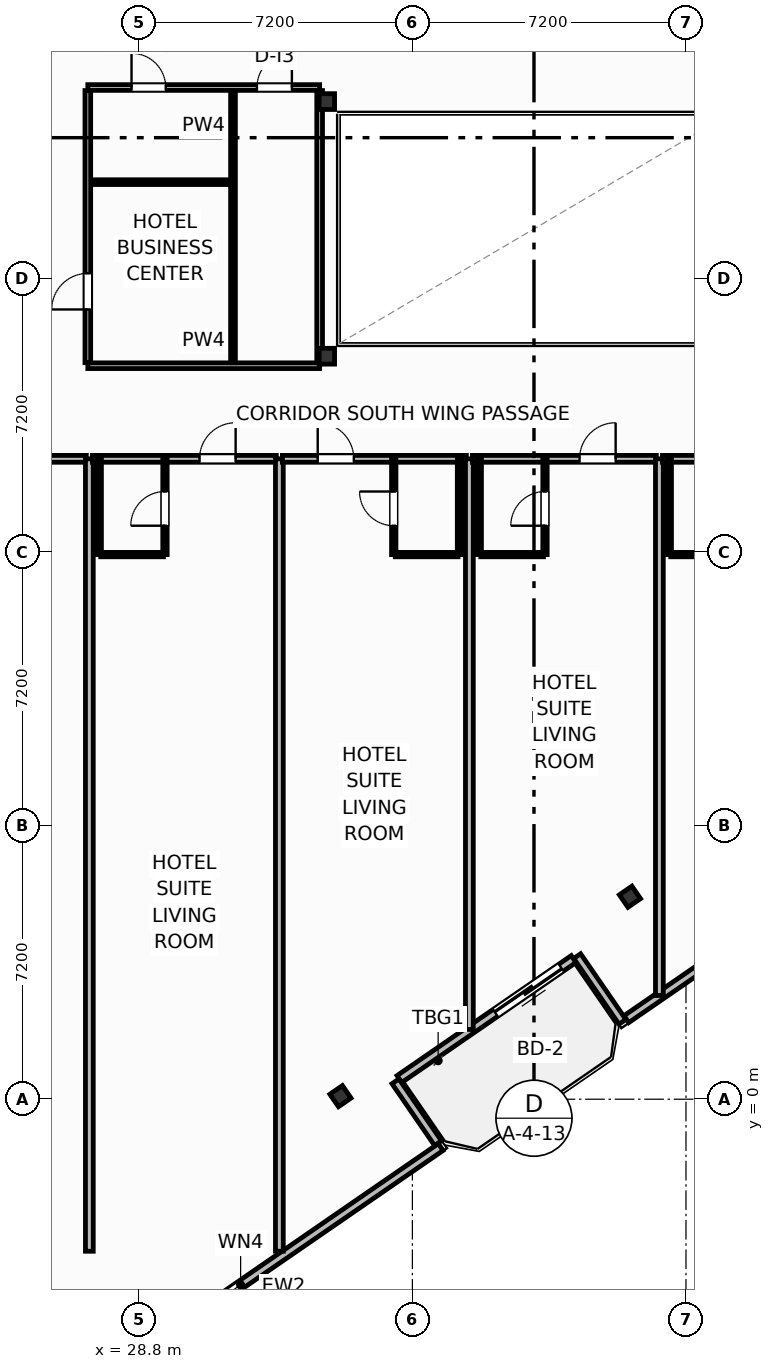
"""IFC4 building model, lengths in metres.
Left out: names, types, materials, properties, quantities, classifications, styles, units other than length and angle.
Written with IfcOpenShell. Run it as: python <this file> out.ifc"""

import sys

from ifc_helpers import new_model, si_unit, direction, frame, frame_2d, origin, origin_2d, place, context, subcontext, project, spatial, rectangle, i_section, extrude, element, fill, save


model = new_model("IFC4")
c1 = context("Model", 3, precision=1e-05, world=origin(), true_north=direction((0.0, 1.0)))
c2 = subcontext(c1, "Body", "Model", "MODEL_VIEW")
j1 = project(units=[si_unit("LENGTHUNIT", "METRE"), si_unit("PLANEANGLEUNIT", "RADIAN")], contexts=[c1])
p1 = place(None, origin())
s1 = spatial("IfcSite", under=j1, at=p1, CompositionType="ELEMENT")
p2 = place(p1, origin())
s2 = spatial("IfcBuilding", under=s1, at=p2, CompositionType="ELEMENT")
p3 = place(p2, frame((0.0, 0.0, 280.4)))
s3 = spatial("IfcBuildingStorey", under=s2, at=p3, CompositionType="ELEMENT", Elevation=280.4)
for number, where, z_axis, x_axis in (
    (1, (33.75, 19.55, 0.0), (0.0, 0.0, 1.0), (1.0, 0.0, 0.0)),
    (2, (33.75, 26.25, 0.0), (0.0, 0.0, 1.0), (1.0, 0.0, 0.0)),
):
    element("IfcColumn", number, at=place(p3, frame(where, z_axis=z_axis, x_axis=x_axis)), inside=s3, PredefinedType="COLUMN", context=c2, shape_type="SweptSolid", body=[
        extrude(i_section(OverallWidth=0.406, OverallDepth=0.416, WebThickness=0.03, FlangeThickness=0.048, FilletRadius=0.025, at=origin_2d()), origin(), (0.0, 0.0, 1.0), 3.7),
    ])
for number, where, z_axis, x_axis in (
    (3, (34.107, 0.081, 0.0), (0.0, 0.0, 1.0), (0.824, 0.567, 0.0)),
    (4, (41.725, 5.328, 0.0), (0.0, 0.0, 1.0), (0.824, 0.567, 0.0)),
):
    element("IfcColumn", number, at=place(p3, frame(where, z_axis=z_axis, x_axis=x_axis)), inside=s3, PredefinedType="COLUMN", context=c2, shape_type="SweptSolid", body=[
        extrude(i_section(OverallWidth=0.401, OverallDepth=0.399, WebThickness=0.025, FlangeThickness=0.04, FilletRadius=0.022, at=origin_2d()), origin(), (0.0, 0.0, 1.0), 3.7),
    ])
p4 = place(p3, frame((40.244, 3.688, 0.0), z_axis=(0.0, 0.0, 1.0), x_axis=(-0.823541290762, -0.567256328665, 0.0)))
e5 = element("IfcWall", 5, at=p4, inside=s3, PredefinedType="SOLIDWALL", context=c2, shape_type="SweptSolid", body=[
    extrude(rectangle(XDim=5.567, YDim=0.22, at=frame_2d((2.784, 0.0))), origin(), (0.0, 0.0, 1.0), 2.73),
])
p5 = place(p4, frame((0.4, 0.0, 0.0)))
e6 = element("IfcOpeningElement", 6, at=p5, cuts=e5, PredefinedType="OPENING", context=c2, shape_type="SweptSolid", body=[
    extrude(rectangle(XDim=2.1, YDim=2.3, at=frame_2d((1.05, 1.15))), frame((0.0, 0.12, 0.0), z_axis=(0.0, -1.0, 0.0), x_axis=(1.0, 0.0, 0.0)), (0.0, 0.0, 1.0), 0.24),
])
p6 = place(p3, frame((27.704, -7.488, 0.0), z_axis=(0.0, 0.0, 1.0), x_axis=(0.823529068157, 0.567274073003, 0.0)))
e7 = element("IfcWall", 7, at=p6, inside=s3, PredefinedType="SOLIDWALL", context=c2, shape_type="SweptSolid", body=[
    extrude(rectangle(XDim=10.98, YDim=0.22, at=frame_2d((5.49, 0.0))), origin(), (0.0, 0.0, 1.0), 2.73),
])
p7 = place(p6, frame((2.486, 0.0, 0.8)))
e8 = element("IfcOpeningElement", 8, at=p7, cuts=e7, PredefinedType="OPENING", context=c2, shape_type="SweptSolid", body=[
    extrude(rectangle(XDim=2.1, YDim=1.75, at=frame_2d((1.05, 0.875))), frame((0.0, 0.12, 0.0), z_axis=(0.0, -1.0, 0.0), x_axis=(1.0, 0.0, 0.0)), (0.0, 0.0, 1.0), 0.24),
])
p8 = place(p3, frame((36.675, -1.156, 0.0), z_axis=(0.0, 0.0, 1.0), x_axis=(-0.567215821234, 0.823569190865, 0.0)))
e9 = element("IfcWall", 9, at=p8, inside=s3, PredefinedType="SOLIDWALL", context=c2, shape_type="SweptSolid", body=[
    extrude(rectangle(XDim=1.975, YDim=0.22, at=frame_2d((0.988, 0.0))), origin(), (0.0, 0.0, 1.0), 2.73),
])
p9 = place(p3, frame((40.337, 3.765, 0.0), z_axis=(0.0, 0.0, 1.0), x_axis=(0.567352541689, -0.823475010816, 0.0)))
e10 = element("IfcWall", 10, at=p9, inside=s3, PredefinedType="SOLIDWALL", context=c2, shape_type="SweptSolid", body=[
    extrude(rectangle(XDim=2.1, YDim=0.22, at=frame_2d((1.05, 0.0))), origin(), (0.0, 0.0, 1.0), 2.73),
])
p10 = place(p3, frame((41.631, 2.106, 0.0), z_axis=(0.0, 0.0, 1.0), x_axis=(0.823530942962, 0.56727135128, 0.0)))
e11 = element("IfcWall", 11, at=p10, inside=s3, PredefinedType="SOLIDWALL", context=c2, shape_type="SweptSolid", body=[
    extrude(rectangle(XDim=8.035, YDim=0.22, at=frame_2d((4.018, 0.0))), origin(), (0.0, 0.0, 1.0), 2.73),
])
p11 = place(p10, frame((2.968, 0.0, 0.8)))
e12 = element("IfcOpeningElement", 12, at=p11, cuts=e11, PredefinedType="OPENING", context=c2, shape_type="SweptSolid", body=[
    extrude(rectangle(XDim=2.1, YDim=1.75, at=frame_2d((1.05, 0.875))), frame((0.0, 0.12, 0.0), z_axis=(0.0, -1.0, 0.0), x_axis=(1.0, 0.0, 0.0)), (0.0, 0.0, 1.0), 0.24),
])
p12 = place(p3, frame((22.58, 16.85, 0.0), z_axis=(0.0, 0.0, 1.0), x_axis=(1.0, 0.0, 0.0)))
e13 = element("IfcWall", 13, at=p12, inside=s3, PredefinedType="PARTITIONING", context=c2, shape_type="SweptSolid", body=[
    extrude(rectangle(XDim=4.84, YDim=0.18, at=frame_2d((2.42, 0.0))), origin(), (0.0, 0.0, 1.0), 3.45),
])
p13 = place(p12, frame((2.819, 0.0, 0.0)))
e14 = element("IfcOpeningElement", 14, at=p13, cuts=e13, PredefinedType="OPENING", context=c2, shape_type="SweptSolid", body=[
    extrude(rectangle(XDim=0.95, YDim=2.15, at=frame_2d((0.475, 1.075))), frame((0.0, 0.1, 0.0), z_axis=(0.0, -1.0, 0.0), x_axis=(1.0, 0.0, 0.0)), (0.0, 0.0, 1.0), 0.2),
])
p14 = place(p3, frame((27.5, -4.0, 0.0), z_axis=(0.0, 0.0, 1.0), x_axis=(0.0, 1.0, 0.0)))
e15 = element("IfcWall", 15, at=p14, inside=s3, PredefinedType="PARTITIONING", context=c2, shape_type="SweptSolid", body=[
    extrude(rectangle(XDim=20.85, YDim=0.205, at=frame_2d((10.425, 0.0))), origin(), (0.0, 0.0, 1.0), 3.45),
])
p15 = place(p3, frame((27.58, 16.85, 0.0), z_axis=(0.0, 0.0, 1.0), x_axis=(1.0, 0.0, 0.0)))
e16 = element("IfcWall", 16, at=p15, inside=s3, PredefinedType="PARTITIONING", context=c2, shape_type="SweptSolid", body=[
    extrude(rectangle(XDim=4.84, YDim=0.18, at=frame_2d((2.42, 0.0))), origin(), (0.0, 0.0, 1.0), 3.45),
])
p16 = place(p15, frame((2.819, 0.0, 0.0)))
e17 = element("IfcOpeningElement", 17, at=p16, cuts=e16, PredefinedType="OPENING", context=c2, shape_type="SweptSolid", body=[
    extrude(rectangle(XDim=0.95, YDim=2.15, at=frame_2d((0.475, 1.075))), frame((0.0, 0.1, 0.0), z_axis=(0.0, -1.0, 0.0), x_axis=(1.0, 0.0, 0.0)), (0.0, 0.0, 1.0), 0.2),
])
p17 = place(p3, frame((27.8, 14.33, 0.0), z_axis=(0.0, 0.0, 1.0), x_axis=(1.0, 0.0, 0.0)))
e18 = element("IfcWall", 18, at=p17, inside=s3, PredefinedType="PARTITIONING", context=c2, shape_type="SweptSolid", body=[
    extrude(rectangle(XDim=1.65, YDim=0.115, at=frame_2d((0.825, 0.0))), origin(), (0.0, 0.0, 1.0), 3.45),
])
p18 = place(p3, frame((29.49, 14.33, 0.0), z_axis=(0.0, 0.0, 1.0), x_axis=(0.0, 1.0, 0.0)))
e19 = element("IfcWall", 19, at=p18, inside=s3, PredefinedType="PARTITIONING", context=c2, shape_type="SweptSolid", body=[
    extrude(rectangle(XDim=2.52, YDim=0.115, at=frame_2d((1.26, 0.0))), origin(), (0.0, 0.0, 1.0), 3.45),
])
p19 = place(p18, frame((0.76, 0.0, 0.0)))
e20 = element("IfcOpeningElement", 20, at=p19, cuts=e19, PredefinedType="OPENING", context=c2, shape_type="SweptSolid", body=[
    extrude(rectangle(XDim=0.9, YDim=2.05, at=frame_2d((0.45, 1.025))), frame((0.0, 0.067, 0.0), z_axis=(0.0, -1.0, 0.0), x_axis=(1.0, 0.0, 0.0)), (0.0, 0.0, 1.0), 0.135),
])
p20 = place(p3, frame((27.76, 14.33, 0.0), z_axis=(0.0, 0.0, 1.0), x_axis=(0.0, 1.0, 0.0)))
e21 = element("IfcWall", 21, at=p20, inside=s3, PredefinedType="PARTITIONING", context=c2, shape_type="SweptSolid", body=[
    extrude(rectangle(XDim=2.52, YDim=0.115, at=frame_2d((1.26, 0.0))), origin(), (0.0, 0.0, 1.0), 3.45),
])
p21 = place(p3, frame((32.5, -4.0, 0.0), z_axis=(0.0, 0.0, 1.0), x_axis=(0.0, 1.0, 0.0)))
e22 = element("IfcWall", 22, at=p21, inside=s3, PredefinedType="PARTITIONING", context=c2, shape_type="SweptSolid", body=[
    extrude(rectangle(XDim=20.85, YDim=0.205, at=frame_2d((10.425, 0.0))), origin(), (0.0, 0.0, 1.0), 3.45),
])
p22 = place(p3, frame((32.58, 16.85, 0.0), z_axis=(0.0, 0.0, 1.0), x_axis=(1.0, 0.0, 0.0)))
e23 = element("IfcWall", 23, at=p22, inside=s3, PredefinedType="PARTITIONING", context=c2, shape_type="SweptSolid", body=[
    extrude(rectangle(XDim=4.84, YDim=0.18, at=frame_2d((2.42, 0.0))), origin(), (0.0, 0.0, 1.0), 3.45),
])
p23 = place(p22, frame((0.929, 0.0, 0.0)))
e24 = element("IfcOpeningElement", 24, at=p23, cuts=e23, PredefinedType="OPENING", context=c2, shape_type="SweptSolid", body=[
    extrude(rectangle(XDim=0.95, YDim=2.15, at=frame_2d((0.475, 1.075))), frame((0.0, 0.1, 0.0), z_axis=(0.0, -1.0, 0.0), x_axis=(1.0, 0.0, 0.0)), (0.0, 0.0, 1.0), 0.2),
])
p24 = place(p3, frame((35.55, 14.33, 0.0), z_axis=(0.0, 0.0, 1.0), x_axis=(1.0, 0.0, 0.0)))
e25 = element("IfcWall", 25, at=p24, inside=s3, PredefinedType="PARTITIONING", context=c2, shape_type="SweptSolid", body=[
    extrude(rectangle(XDim=1.65, YDim=0.115, at=frame_2d((0.825, 0.0))), origin(), (0.0, 0.0, 1.0), 3.45),
])
p25 = place(p3, frame((35.51, 14.33, 0.0), z_axis=(0.0, 0.0, 1.0), x_axis=(0.0, 1.0, 0.0)))
e26 = element("IfcWall", 26, at=p25, inside=s3, PredefinedType="PARTITIONING", context=c2, shape_type="SweptSolid", body=[
    extrude(rectangle(XDim=2.52, YDim=0.115, at=frame_2d((1.26, 0.0))), origin(), (0.0, 0.0, 1.0), 3.45),
])
p26 = place(p25, frame((0.76, 0.0, 0.0)))
e27 = element("IfcOpeningElement", 27, at=p26, cuts=e26, PredefinedType="OPENING", context=c2, shape_type="SweptSolid", body=[
    extrude(rectangle(XDim=0.9, YDim=2.05, at=frame_2d((0.45, 1.025))), frame((0.0, 0.067, 0.0), z_axis=(0.0, -1.0, 0.0), x_axis=(1.0, 0.0, 0.0)), (0.0, 0.0, 1.0), 0.135),
])
p27 = place(p3, frame((37.24, 14.33, 0.0), z_axis=(0.0, 0.0, 1.0), x_axis=(0.0, 1.0, 0.0)))
e28 = element("IfcWall", 28, at=p27, inside=s3, PredefinedType="PARTITIONING", context=c2, shape_type="SweptSolid", body=[
    extrude(rectangle(XDim=2.52, YDim=0.115, at=frame_2d((1.26, 0.0))), origin(), (0.0, 0.0, 1.0), 3.45),
])
p28 = place(p3, frame((37.5, 1.835, 0.0), z_axis=(0.0, 0.0, 1.0), x_axis=(0.0, 1.0, 0.0)))
e29 = element("IfcWall", 29, at=p28, inside=s3, PredefinedType="PARTITIONING", context=c2, shape_type="SweptSolid", body=[
    extrude(rectangle(XDim=15.015, YDim=0.205, at=frame_2d((7.508, 0.0))), origin(), (0.0, 0.0, 1.0), 3.45),
])
p29 = place(p3, frame((37.58, 16.85, 0.0), z_axis=(0.0, 0.0, 1.0), x_axis=(1.0, 0.0, 0.0)))
e30 = element("IfcWall", 30, at=p29, inside=s3, PredefinedType="PARTITIONING", context=c2, shape_type="SweptSolid", body=[
    extrude(rectangle(XDim=4.84, YDim=0.18, at=frame_2d((2.42, 0.0))), origin(), (0.0, 0.0, 1.0), 3.45),
])
p30 = place(p29, frame((2.819, 0.0, 0.0)))
e31 = element("IfcOpeningElement", 31, at=p30, cuts=e30, PredefinedType="OPENING", context=c2, shape_type="SweptSolid", body=[
    extrude(rectangle(XDim=0.95, YDim=2.15, at=frame_2d((0.475, 1.075))), frame((0.0, 0.1, 0.0), z_axis=(0.0, -1.0, 0.0), x_axis=(1.0, 0.0, 0.0)), (0.0, 0.0, 1.0), 0.2),
])
p31 = place(p3, frame((37.8, 14.33, 0.0), z_axis=(0.0, 0.0, 1.0), x_axis=(1.0, 0.0, 0.0)))
e32 = element("IfcWall", 32, at=p31, inside=s3, PredefinedType="PARTITIONING", context=c2, shape_type="SweptSolid", body=[
    extrude(rectangle(XDim=1.65, YDim=0.115, at=frame_2d((0.825, 0.0))), origin(), (0.0, 0.0, 1.0), 3.45),
])
p32 = place(p3, frame((39.49, 14.33, 0.0), z_axis=(0.0, 0.0, 1.0), x_axis=(0.0, 1.0, 0.0)))
e33 = element("IfcWall", 33, at=p32, inside=s3, PredefinedType="PARTITIONING", context=c2, shape_type="SweptSolid", body=[
    extrude(rectangle(XDim=2.52, YDim=0.115, at=frame_2d((1.26, 0.0))), origin(), (0.0, 0.0, 1.0), 3.45),
])
p33 = place(p32, frame((0.76, 0.0, 0.0)))
e34 = element("IfcOpeningElement", 34, at=p33, cuts=e33, PredefinedType="OPENING", context=c2, shape_type="SweptSolid", body=[
    extrude(rectangle(XDim=0.9, YDim=2.05, at=frame_2d((0.45, 1.025))), frame((0.0, 0.067, 0.0), z_axis=(0.0, -1.0, 0.0), x_axis=(1.0, 0.0, 0.0)), (0.0, 0.0, 1.0), 0.135),
])
p34 = place(p3, frame((37.76, 14.33, 0.0), z_axis=(0.0, 0.0, 1.0), x_axis=(0.0, 1.0, 0.0)))
e35 = element("IfcWall", 35, at=p34, inside=s3, PredefinedType="PARTITIONING", context=c2, shape_type="SweptSolid", body=[
    extrude(rectangle(XDim=2.52, YDim=0.115, at=frame_2d((1.26, 0.0))), origin(), (0.0, 0.0, 1.0), 3.45),
])
p35 = place(p3, frame((42.5, 2.729, 0.0), z_axis=(0.0, 0.0, 1.0), x_axis=(0.0, 1.0, 0.0)))
e36 = element("IfcWall", 36, at=p35, inside=s3, PredefinedType="PARTITIONING", context=c2, shape_type="SweptSolid", body=[
    extrude(rectangle(XDim=14.121, YDim=0.205, at=frame_2d((7.061, 0.0))), origin(), (0.0, 0.0, 1.0), 2.739),
])
p36 = place(p3, frame((42.58, 16.85, 0.0), z_axis=(0.0, 0.0, 1.0), x_axis=(1.0, 0.0, 0.0)))
e37 = element("IfcWall", 37, at=p36, inside=s3, PredefinedType="PARTITIONING", context=c2, shape_type="SweptSolid", body=[
    extrude(rectangle(XDim=4.84, YDim=0.18, at=frame_2d((2.42, 0.0))), origin(), (0.0, 0.0, 1.0), 3.45),
])
p37 = place(p36, frame((2.819, 0.0, 0.0)))
e38 = element("IfcOpeningElement", 38, at=p37, cuts=e37, PredefinedType="OPENING", context=c2, shape_type="SweptSolid", body=[
    extrude(rectangle(XDim=0.95, YDim=2.15, at=frame_2d((0.475, 1.075))), frame((0.0, 0.1, 0.0), z_axis=(0.0, -1.0, 0.0), x_axis=(1.0, 0.0, 0.0)), (0.0, 0.0, 1.0), 0.2),
])
p38 = place(p3, frame((42.8, 14.33, 0.0), z_axis=(0.0, 0.0, 1.0), x_axis=(1.0, 0.0, 0.0)))
e39 = element("IfcWall", 39, at=p38, inside=s3, PredefinedType="PARTITIONING", context=c2, shape_type="SweptSolid", body=[
    extrude(rectangle(XDim=1.65, YDim=0.115, at=frame_2d((0.825, 0.0))), origin(), (0.0, 0.0, 1.0), 3.45),
])
p39 = place(p3, frame((42.76, 14.33, 0.0), z_axis=(0.0, 0.0, 1.0), x_axis=(0.0, 1.0, 0.0)))
e40 = element("IfcWall", 40, at=p39, inside=s3, PredefinedType="PARTITIONING", context=c2, shape_type="SweptSolid", body=[
    extrude(rectangle(XDim=2.52, YDim=0.115, at=frame_2d((1.26, 0.0))), origin(), (0.0, 0.0, 1.0), 3.45),
])
p40 = place(p3, frame((27.46, 19.3, 0.0), z_axis=(0.0, 0.0, 1.0), x_axis=(1.0, 0.0, 0.0)))
e41 = element("IfcWall", 41, at=p40, inside=s3, PredefinedType="PARTITIONING", context=c2, shape_type="SweptSolid", body=[
    extrude(rectangle(XDim=6.1, YDim=0.15, at=frame_2d((3.05, 0.0))), origin(), (0.0, 0.0, 1.0), 2.662),
])
p41 = place(p3, frame((27.46, 26.62, 0.0), z_axis=(0.0, 0.0, 1.0), x_axis=(1.0, 0.0, 0.0)))
e42 = element("IfcWall", 42, at=p41, inside=s3, PredefinedType="PARTITIONING", context=c2, shape_type="SweptSolid", body=[
    extrude(rectangle(XDim=6.1, YDim=0.15, at=frame_2d((3.05, 0.0))), origin(), (0.0, 0.0, 1.0), 2.662),
])
p42 = place(p41, frame((1.15, 0.0, 0.0)))
e43 = element("IfcOpeningElement", 43, at=p42, cuts=e42, PredefinedType="OPENING", context=c2, shape_type="SweptSolid", body=[
    extrude(rectangle(XDim=0.9, YDim=2.05, at=frame_2d((0.45, 1.025))), frame((0.0, 0.085, 0.0), z_axis=(0.0, -1.0, 0.0), x_axis=(1.0, 0.0, 0.0)), (0.0, 0.0, 1.0), 0.17),
])
p43 = place(p41, frame((4.45, 0.0, 0.0)))
e44 = element("IfcOpeningElement", 44, at=p43, cuts=e42, PredefinedType="OPENING", context=c2, shape_type="SweptSolid", body=[
    extrude(rectangle(XDim=0.92, YDim=2.05, at=frame_2d((0.46, 1.025))), frame((0.0, 0.085, 0.0), z_axis=(0.0, -1.0, 0.0), x_axis=(1.0, 0.0, 0.0)), (0.0, 0.0, 1.0), 0.17),
])
p44 = place(p3, frame((31.28, 19.38, 0.0), z_axis=(0.0, 0.0, 1.0), x_axis=(0.0, 1.0, 0.0)))
e45 = element("IfcWall", 45, at=p44, inside=s3, PredefinedType="PARTITIONING", context=c2, shape_type="SweptSolid", body=[
    extrude(rectangle(XDim=7.16, YDim=0.125, at=frame_2d((3.58, 0.0))), origin(), (0.0, 0.0, 1.0), 3.45),
])
p45 = place(p3, frame((27.52, 24.13, 0.0), z_axis=(0.0, 0.0, 1.0), x_axis=(1.0, 0.0, 0.0)))
e46 = element("IfcWall", 46, at=p45, inside=s3, PredefinedType="PARTITIONING", context=c2, shape_type="SweptSolid", body=[
    extrude(rectangle(XDim=3.7, YDim=0.125, at=frame_2d((1.85, 0.0))), origin(), (0.0, 0.0, 1.0), 3.45),
])
p46 = place(p3, frame((27.46, 19.38, 0.0), z_axis=(0.0, 0.0, 1.0), x_axis=(0.0, 1.0, 0.0)))
e47 = element("IfcWall", 47, at=p46, inside=s3, PredefinedType="PARTITIONING", context=c2, shape_type="SweptSolid", body=[
    extrude(rectangle(XDim=7.16, YDim=0.15, at=frame_2d((3.58, 0.0))), origin(), (0.0, 0.0, 1.0), 3.45),
])
p47 = place(p46, frame((1.4, 0.0, 0.0)))
e48 = element("IfcOpeningElement", 48, at=p47, cuts=e47, PredefinedType="OPENING", context=c2, shape_type="SweptSolid", body=[
    extrude(rectangle(XDim=0.95, YDim=2.05, at=frame_2d((0.475, 1.025))), frame((0.0, 0.085, 0.0), z_axis=(0.0, -1.0, 0.0), x_axis=(1.0, 0.0, 0.0)), (0.0, 0.0, 1.0), 0.17),
])
p48 = place(p3, frame((33.56, 19.38, 0.0), z_axis=(0.0, 0.0, 1.0), x_axis=(0.0, 1.0, 0.0)))
e49 = element("IfcWall", 49, at=p48, inside=s3, PredefinedType="PARTITIONING", context=c2, shape_type="SweptSolid", body=[
    extrude(rectangle(XDim=7.16, YDim=0.15, at=frame_2d((3.58, 0.0))), origin(), (0.0, 0.0, 1.0), 2.824),
])
p49 = place(p5, origin())
e50 = element("IfcDoor", 50, at=p49, inside=s3, OperationType="SLIDING_TO_LEFT", PredefinedType="DOOR", context=c2, shape_type="SweptSolid", body=[
    extrude(rectangle(XDim=2.1, YDim=2.3, at=frame_2d((1.05, 1.15))), frame((0.0, 0.025, 0.0), z_axis=(0.0, -1.0, 0.0), x_axis=(1.0, 0.0, 0.0)), (0.0, 0.0, 1.0), 0.05),
])
fill(e6, e50)
p50 = place(p7, origin())
e51 = element("IfcWindow", 51, at=p50, inside=s3, PartitioningType="SINGLE_PANEL", PredefinedType="WINDOW", context=c2, shape_type="SweptSolid", body=[
    extrude(rectangle(XDim=2.1, YDim=1.75, at=frame_2d((1.05, 0.875))), frame((0.0, 0.03, 0.0), z_axis=(0.0, -1.0, 0.0), x_axis=(1.0, 0.0, 0.0)), (0.0, 0.0, 1.0), 0.06),
])
fill(e8, e51)
p51 = place(p16, origin())
e52 = element("IfcDoor", 52, at=p51, inside=s3, OperationType="SINGLE_SWING_RIGHT", PredefinedType="DOOR", context=c2, shape_type="SweptSolid", body=[
    extrude(rectangle(XDim=0.95, YDim=2.15, at=frame_2d((0.475, 1.075))), frame((0.0, 0.025, 0.0), z_axis=(0.0, -1.0, 0.0), x_axis=(1.0, 0.0, 0.0)), (0.0, 0.0, 1.0), 0.05),
])
fill(e17, e52)
p52 = place(p19, origin())
e53 = element("IfcDoor", 53, at=p52, inside=s3, OperationType="SINGLE_SWING_LEFT", PredefinedType="DOOR", context=c2, shape_type="SweptSolid", body=[
    extrude(rectangle(XDim=0.9, YDim=2.05, at=frame_2d((0.45, 1.025))), frame((0.0, 0.025, 0.0), z_axis=(0.0, -1.0, 0.0), x_axis=(1.0, 0.0, 0.0)), (0.0, 0.0, 1.0), 0.05),
])
fill(e20, e53)
p53 = place(p23, origin())
e54 = element("IfcDoor", 54, at=p53, inside=s3, OperationType="SINGLE_SWING_LEFT", PredefinedType="DOOR", context=c2, shape_type="SweptSolid", body=[
    extrude(rectangle(XDim=0.95, YDim=2.15, at=frame_2d((0.475, 1.075))), frame((0.0, 0.025, 0.0), z_axis=(0.0, -1.0, 0.0), x_axis=(1.0, 0.0, 0.0)), (0.0, 0.0, 1.0), 0.05),
])
fill(e24, e54)
p54 = place(p26, origin())
e55 = element("IfcDoor", 55, at=p54, inside=s3, OperationType="SINGLE_SWING_RIGHT", PredefinedType="DOOR", context=c2, shape_type="SweptSolid", body=[
    extrude(rectangle(XDim=0.9, YDim=2.05, at=frame_2d((0.45, 1.025))), frame((0.0, 0.025, 0.0), z_axis=(0.0, -1.0, 0.0), x_axis=(1.0, 0.0, 0.0)), (0.0, 0.0, 1.0), 0.05),
])
fill(e27, e55)
p55 = place(p30, origin())
e56 = element("IfcDoor", 56, at=p55, inside=s3, OperationType="SINGLE_SWING_RIGHT", PredefinedType="DOOR", context=c2, shape_type="SweptSolid", body=[
    extrude(rectangle(XDim=0.95, YDim=2.15, at=frame_2d((0.475, 1.075))), frame((0.0, 0.025, 0.0), z_axis=(0.0, -1.0, 0.0), x_axis=(1.0, 0.0, 0.0)), (0.0, 0.0, 1.0), 0.05),
])
fill(e31, e56)
p56 = place(p33, origin())
e57 = element("IfcDoor", 57, at=p56, inside=s3, OperationType="SINGLE_SWING_LEFT", PredefinedType="DOOR", context=c2, shape_type="SweptSolid", body=[
    extrude(rectangle(XDim=0.9, YDim=2.05, at=frame_2d((0.45, 1.025))), frame((0.0, 0.025, 0.0), z_axis=(0.0, -1.0, 0.0), x_axis=(1.0, 0.0, 0.0)), (0.0, 0.0, 1.0), 0.05),
])
fill(e34, e57)
p57 = place(p42, origin())
e58 = element("IfcDoor", 58, at=p57, inside=s3, OperationType="SINGLE_SWING_LEFT", PredefinedType="DOOR", context=c2, shape_type="SweptSolid", body=[
    extrude(rectangle(XDim=0.9, YDim=2.05, at=frame_2d((0.45, 1.025))), frame((0.0, 0.025, 0.0), z_axis=(0.0, -1.0, 0.0), x_axis=(1.0, 0.0, 0.0)), (0.0, 0.0, 1.0), 0.05),
])
fill(e43, e58)
p58 = place(p43, origin())
e59 = element("IfcDoor", 59, at=p58, inside=s3, OperationType="SINGLE_SWING_RIGHT", PredefinedType="DOOR", context=c2, shape_type="SweptSolid", body=[
    extrude(rectangle(XDim=0.92, YDim=2.05, at=frame_2d((0.46, 1.025))), frame((0.0, 0.025, 0.0), z_axis=(0.0, -1.0, 0.0), x_axis=(1.0, 0.0, 0.0)), (0.0, 0.0, 1.0), 0.05),
])
fill(e44, e59)
p59 = place(p47, origin())
e60 = element("IfcDoor", 60, at=p59, inside=s3, OperationType="SINGLE_SWING_LEFT", PredefinedType="DOOR", context=c2, shape_type="SweptSolid", body=[
    extrude(rectangle(XDim=0.95, YDim=2.05, at=frame_2d((0.475, 1.025))), frame((0.0, 0.025, 0.0), z_axis=(0.0, -1.0, 0.0), x_axis=(1.0, 0.0, 0.0)), (0.0, 0.0, 1.0), 0.05),
])
fill(e48, e60)
save(model, sys.argv[1])
